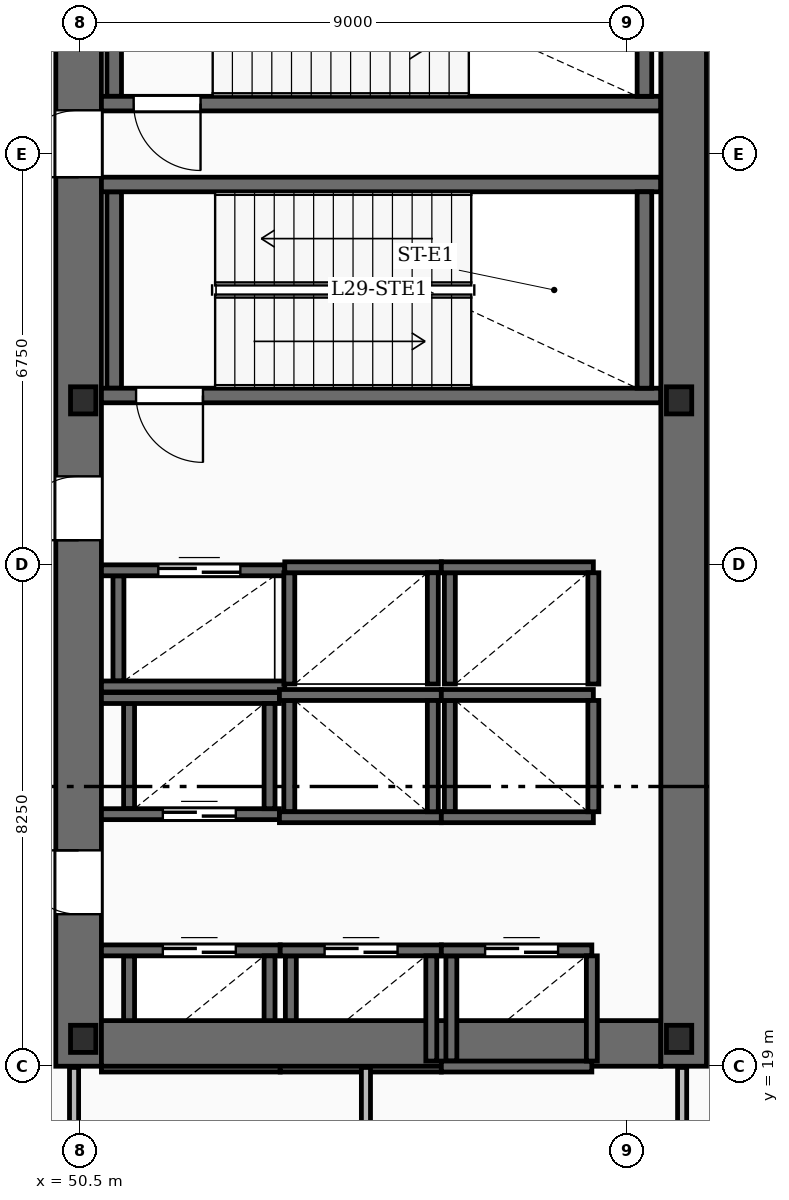
"""IFC4 building model, lengths in metres.
Left out: names, types, materials, properties, quantities, classifications, styles, units other than length and angle.
Written with IfcOpenShell. Run it as: python <this file> out.ifc"""

import sys

from ifc_helpers import new_model, si_unit, direction, frame, frame_2d, origin, origin_2d, place, context, subcontext, project, spatial, rectangle, i_section, extrude, element, fill, save


model = new_model("IFC4")
c1 = context("Model", 3, precision=1e-05, world=origin(), true_north=direction((0.0, 1.0)))
c2 = subcontext(c1, "Body", "Model", "MODEL_VIEW")
j1 = project(units=[si_unit("LENGTHUNIT", "METRE"), si_unit("PLANEANGLEUNIT", "RADIAN")], contexts=[c1])
p1 = place(None, origin())
s1 = spatial("IfcSite", under=j1, at=p1, CompositionType="ELEMENT")
p2 = place(p1, origin())
s2 = spatial("IfcBuilding", under=s1, at=p2, CompositionType="ELEMENT")
p3 = place(p2, frame((0.0, 0.0, 125.95)))
s3 = spatial("IfcBuildingStorey", under=s2, at=p3, CompositionType="ELEMENT", Elevation=125.95)
p4 = place(p3, frame((50.475, 19.0, -0.31), z_axis=(0.0, 0.0, 1.0), x_axis=(0.0, 1.0, 0.0)))
e1 = element("IfcWall", 1, at=p4, inside=s3, PredefinedType="SHEAR", context=c2, shape_type="SweptSolid", body=[
    extrude(rectangle(XDim=20.8, YDim=0.75, at=frame_2d((10.4, 0.0))), origin(), (0.0, 0.0, 1.0), 4.84),
])
p5 = place(p4, frame((2.5, 0.0, 0.31)))
e2 = element("IfcOpeningElement", 2, at=p5, cuts=e1, PredefinedType="OPENING", context=c2, shape_type="SweptSolid", body=[
    extrude(rectangle(XDim=1.05, YDim=2.15, at=frame_2d((0.525, 1.075))), frame((0.0, 0.385, 0.0), z_axis=(0.0, -1.0, 0.0), x_axis=(1.0, 0.0, 0.0)), (0.0, 0.0, 1.0), 0.77),
])
p6 = place(p4, frame((8.65, 0.0, 0.31)))
e3 = element("IfcOpeningElement", 3, at=p6, cuts=e1, PredefinedType="OPENING", context=c2, shape_type="SweptSolid", body=[
    extrude(rectangle(XDim=1.05, YDim=2.15, at=frame_2d((0.525, 1.075))), frame((0.0, 0.385, 0.0), z_axis=(0.0, -1.0, 0.0), x_axis=(1.0, 0.0, 0.0)), (0.0, 0.0, 1.0), 0.77),
])
p7 = place(p4, frame((14.62, 0.0, 0.31)))
e4 = element("IfcOpeningElement", 4, at=p7, cuts=e1, PredefinedType="OPENING", context=c2, shape_type="SweptSolid", body=[
    extrude(rectangle(XDim=1.1, YDim=2.15, at=frame_2d((0.55, 1.075))), frame((0.0, 0.385, 0.0), z_axis=(0.0, -1.0, 0.0), x_axis=(1.0, 0.0, 0.0)), (0.0, 0.0, 1.0), 0.77),
])
p8 = place(p3, frame((60.425, 19.0, -0.31), z_axis=(0.0, 0.0, 1.0), x_axis=(0.0, 1.0, 0.0)))
e5 = element("IfcWall", 5, at=p8, inside=s3, PredefinedType="SHEAR", context=c2, shape_type="SweptSolid", body=[
    extrude(rectangle(XDim=20.8, YDim=0.75, at=frame_2d((10.4, 0.0))), origin(), (0.0, 0.0, 1.0), 4.84),
])
p9 = place(p3, frame((50.85, 19.375, -0.31), z_axis=(0.0, 0.0, 1.0), x_axis=(1.0, 0.0, 0.0)))
e6 = element("IfcWall", 6, at=p9, inside=s3, PredefinedType="SHEAR", context=c2, shape_type="SweptSolid", body=[
    extrude(rectangle(XDim=9.2, YDim=0.75, at=frame_2d((4.6, 0.0))), origin(), (0.0, 0.0, 1.0), 4.84),
])
for number, where, z_axis, x_axis in (
    (7, (50.55, 19.45, -0.31), (0.0, 0.0, 1.0), (1.0, 0.0, 0.0)),
    (8, (60.35, 19.45, -0.31), (0.0, 0.0, 1.0), (1.0, 0.0, 0.0)),
    (9, (50.55, 29.95, -0.31), (0.0, 0.0, 1.0), (1.0, 0.0, 0.0)),
    (10, (60.35, 29.95, -0.31), (0.0, 0.0, 1.0), (1.0, 0.0, 0.0)),
):
    element("IfcColumn", number, at=place(p3, frame(where, z_axis=z_axis, x_axis=x_axis)), inside=s3, PredefinedType="COLUMN", context=c2, shape_type="SweptSolid", body=[
        extrude(i_section(OverallWidth=0.416, OverallDepth=0.446, WebThickness=0.039, FlangeThickness=0.063, FilletRadius=0.02, at=origin_2d()), origin(), (0.0, 0.0, 1.0), 4.84),
    ])
p10 = place(p3, frame((60.05, 30.03, 0.0), z_axis=(0.0, 0.0, 1.0), x_axis=(-1.0, 0.0, 0.0)))
e11 = element("IfcWall", 11, at=p10, inside=s3, PredefinedType="SOLIDWALL", context=c2, shape_type="SweptSolid", body=[
    extrude(rectangle(XDim=9.2, YDim=0.24, at=frame_2d((4.6, 0.0))), origin(), (0.0, 0.0, 1.0), 4.53),
])
p11 = place(p10, frame((7.53, 0.0, 0.0)))
e12 = element("IfcOpeningElement", 12, at=p11, cuts=e11, PredefinedType="OPENING", context=c2, shape_type="SweptSolid", body=[
    extrude(rectangle(XDim=1.1, YDim=2.15, at=frame_2d((0.55, 1.075))), frame((0.0, 0.13, 0.0), z_axis=(0.0, -1.0, 0.0), x_axis=(1.0, 0.0, 0.0)), (0.0, 0.0, 1.0), 0.26),
])
p12 = place(p3, frame((50.85, 33.5, 0.0), z_axis=(0.0, 0.0, 1.0), x_axis=(1.0, 0.0, 0.0)))
e13 = element("IfcWall", 13, at=p12, inside=s3, PredefinedType="SOLIDWALL", context=c2, shape_type="SweptSolid", body=[
    extrude(rectangle(XDim=9.2, YDim=0.24, at=frame_2d((4.6, 0.0))), origin(), (0.0, 0.0, 1.0), 4.53),
])
for number, where, z_axis, x_axis in (
    (14, (51.06, 30.15, 0.0), (0.0, 0.0, 1.0), (0.0, 1.0, 0.0)),
    (15, (59.78, 30.15, 0.0), (0.0, 0.0, 1.0), (0.0, 1.0, 0.0)),
):
    element("IfcWall", number, at=place(p3, frame(where, z_axis=z_axis, x_axis=x_axis)), inside=s3, PredefinedType="SOLIDWALL", context=c2, shape_type="SweptSolid", body=[
        extrude(rectangle(XDim=3.23, YDim=0.24, at=frame_2d((1.615, 0.0))), origin(), (0.0, 0.0, 1.0), 4.53),
    ])
p13 = place(p3, frame((60.05, 34.83, 0.0), z_axis=(0.0, 0.0, 1.0), x_axis=(-1.0, 0.0, 0.0)))
e16 = element("IfcWall", 16, at=p13, inside=s3, PredefinedType="SOLIDWALL", context=c2, shape_type="SweptSolid", body=[
    extrude(rectangle(XDim=9.2, YDim=0.24, at=frame_2d((4.6, 0.0))), origin(), (0.0, 0.0, 1.0), 4.53),
])
p14 = place(p13, frame((7.57, 0.0, 0.0)))
e17 = element("IfcOpeningElement", 17, at=p14, cuts=e16, PredefinedType="OPENING", context=c2, shape_type="SweptSolid", body=[
    extrude(rectangle(XDim=1.1, YDim=2.15, at=frame_2d((0.55, 1.075))), frame((0.0, 0.13, 0.0), z_axis=(0.0, -1.0, 0.0), x_axis=(1.0, 0.0, 0.0)), (0.0, 0.0, 1.0), 0.26),
])
for number, where, z_axis, x_axis in (
    (18, (51.06, 34.95, 0.0), (0.0, 0.0, 1.0), (0.0, 1.0, 0.0)),
    (19, (59.78, 34.95, 0.0), (0.0, 0.0, 1.0), (0.0, 1.0, 0.0)),
):
    element("IfcWall", number, at=place(p3, frame(where, z_axis=z_axis, x_axis=x_axis)), inside=s3, PredefinedType="SOLIDWALL", context=c2, shape_type="SweptSolid", body=[
        extrude(rectangle(XDim=3.15, YDim=0.24, at=frame_2d((1.575, 0.0))), origin(), (0.0, 0.0, 1.0), 4.53),
    ])
p15 = place(p3, frame((50.85, 20.905, 0.0), z_axis=(0.0, 0.0, 1.0), x_axis=(1.0, 0.0, 0.0)))
e20 = element("IfcWall", 20, at=p15, inside=s3, PredefinedType="SOLIDWALL", context=c2, shape_type="SweptSolid", body=[
    extrude(rectangle(XDim=2.94, YDim=0.18, at=frame_2d((1.47, 0.0))), origin(), (0.0, 0.0, 1.0), 4.53),
])
p16 = place(p15, frame((1.01, 0.0, 0.0)))
e21 = element("IfcOpeningElement", 21, at=p16, cuts=e20, PredefinedType="OPENING", context=c2, shape_type="SweptSolid", body=[
    extrude(rectangle(XDim=1.2, YDim=2.2, at=frame_2d((0.6, 1.1))), frame((0.0, 0.1, 0.0), z_axis=(0.0, -1.0, 0.0), x_axis=(1.0, 0.0, 0.0)), (0.0, 0.0, 1.0), 0.2),
])
p17 = place(p3, frame((50.85, 18.995, 0.0), z_axis=(0.0, 0.0, 1.0), x_axis=(1.0, 0.0, 0.0)))
e22 = element("IfcWall", 22, at=p17, inside=s3, PredefinedType="SOLIDWALL", context=c2, shape_type="SweptSolid", body=[
    extrude(rectangle(XDim=2.94, YDim=0.18, at=frame_2d((1.47, 0.0))), origin(), (0.0, 0.0, 1.0), 4.53),
])
for number, where, z_axis, x_axis in (
    (23, (51.305, 19.085, 0.0), (0.0, 0.0, 1.0), (0.0, 1.0, 0.0)),
    (24, (53.615, 19.085, 0.0), (0.0, 0.0, 1.0), (0.0, 1.0, 0.0)),
):
    element("IfcWall", number, at=place(p3, frame(where, z_axis=z_axis, x_axis=x_axis)), inside=s3, PredefinedType="SOLIDWALL", context=c2, shape_type="SweptSolid", body=[
        extrude(rectangle(XDim=1.73, YDim=0.18, at=frame_2d((0.865, 0.0))), origin(), (0.0, 0.0, 1.0), 4.53),
    ])
p18 = place(p3, frame((53.79, 20.905, 0.0), z_axis=(0.0, 0.0, 1.0), x_axis=(1.0, 0.0, 0.0)))
e25 = element("IfcWall", 25, at=p18, inside=s3, PredefinedType="SOLIDWALL", context=c2, shape_type="SweptSolid", body=[
    extrude(rectangle(XDim=2.65, YDim=0.18, at=frame_2d((1.325, 0.0))), origin(), (0.0, 0.0, 1.0), 4.53),
])
p19 = place(p18, frame((0.73, 0.0, 0.0)))
e26 = element("IfcOpeningElement", 26, at=p19, cuts=e25, PredefinedType="OPENING", context=c2, shape_type="SweptSolid", body=[
    extrude(rectangle(XDim=1.2, YDim=2.2, at=frame_2d((0.6, 1.1))), frame((0.0, 0.1, 0.0), z_axis=(0.0, -1.0, 0.0), x_axis=(1.0, 0.0, 0.0)), (0.0, 0.0, 1.0), 0.2),
])
p20 = place(p3, frame((53.79, 18.995, 0.0), z_axis=(0.0, 0.0, 1.0), x_axis=(1.0, 0.0, 0.0)))
e27 = element("IfcWall", 27, at=p20, inside=s3, PredefinedType="SOLIDWALL", context=c2, shape_type="SweptSolid", body=[
    extrude(rectangle(XDim=2.65, YDim=0.18, at=frame_2d((1.325, 0.0))), origin(), (0.0, 0.0, 1.0), 4.53),
])
for number, where, z_axis, x_axis in (
    (28, (53.965, 19.085, 0.0), (0.0, 0.0, 1.0), (0.0, 1.0, 0.0)),
    (29, (56.275, 19.085, 0.0), (0.0, 0.0, 1.0), (0.0, 1.0, 0.0)),
):
    element("IfcWall", number, at=place(p3, frame(where, z_axis=z_axis, x_axis=x_axis)), inside=s3, PredefinedType="SOLIDWALL", context=c2, shape_type="SweptSolid", body=[
        extrude(rectangle(XDim=1.73, YDim=0.18, at=frame_2d((0.865, 0.0))), origin(), (0.0, 0.0, 1.0), 4.53),
    ])
p21 = place(p3, frame((56.44, 20.905, 0.0), z_axis=(0.0, 0.0, 1.0), x_axis=(1.0, 0.0, 0.0)))
e30 = element("IfcWall", 30, at=p21, inside=s3, PredefinedType="SOLIDWALL", context=c2, shape_type="SweptSolid", body=[
    extrude(rectangle(XDim=2.475, YDim=0.18, at=frame_2d((1.238, 0.0))), origin(), (0.0, 0.0, 1.0), 4.53),
])
p22 = place(p21, frame((0.72, 0.0, 0.0)))
e31 = element("IfcOpeningElement", 31, at=p22, cuts=e30, PredefinedType="OPENING", context=c2, shape_type="SweptSolid", body=[
    extrude(rectangle(XDim=1.2, YDim=2.2, at=frame_2d((0.6, 1.1))), frame((0.0, 0.1, 0.0), z_axis=(0.0, -1.0, 0.0), x_axis=(1.0, 0.0, 0.0)), (0.0, 0.0, 1.0), 0.2),
])
p23 = place(p3, frame((56.44, 18.995, 0.0), z_axis=(0.0, 0.0, 1.0), x_axis=(1.0, 0.0, 0.0)))
e32 = element("IfcWall", 32, at=p23, inside=s3, PredefinedType="SOLIDWALL", context=c2, shape_type="SweptSolid", body=[
    extrude(rectangle(XDim=2.475, YDim=0.18, at=frame_2d((1.238, 0.0))), origin(), (0.0, 0.0, 1.0), 4.53),
])
for number, where, z_axis, x_axis in (
    (33, (56.605, 19.085, 0.0), (0.0, 0.0, 1.0), (0.0, 1.0, 0.0)),
    (34, (58.915, 19.085, 0.0), (0.0, 0.0, 1.0), (0.0, 1.0, 0.0)),
):
    element("IfcWall", number, at=place(p3, frame(where, z_axis=z_axis, x_axis=x_axis)), inside=s3, PredefinedType="SOLIDWALL", context=c2, shape_type="SweptSolid", body=[
        extrude(rectangle(XDim=1.73, YDim=0.18, at=frame_2d((0.865, 0.0))), origin(), (0.0, 0.0, 1.0), 4.53),
    ])
p24 = place(p3, frame((50.85, 25.055, 0.0), z_axis=(0.0, 0.0, 1.0), x_axis=(1.0, 0.0, 0.0)))
e35 = element("IfcWall", 35, at=p24, inside=s3, PredefinedType="SOLIDWALL", context=c2, shape_type="SweptSolid", body=[
    extrude(rectangle(XDim=2.927, YDim=0.18, at=frame_2d((1.464, 0.0))), origin(), (0.0, 0.0, 1.0), 4.53),
])
p25 = place(p3, frame((50.85, 23.145, 0.0), z_axis=(0.0, 0.0, 1.0), x_axis=(1.0, 0.0, 0.0)))
e36 = element("IfcWall", 36, at=p25, inside=s3, PredefinedType="SOLIDWALL", context=c2, shape_type="SweptSolid", body=[
    extrude(rectangle(XDim=2.927, YDim=0.18, at=frame_2d((1.464, 0.0))), origin(), (0.0, 0.0, 1.0), 4.53),
])
p26 = place(p25, frame((1.01, 0.0, 0.0)))
e37 = element("IfcOpeningElement", 37, at=p26, cuts=e36, PredefinedType="OPENING", context=c2, shape_type="SweptSolid", body=[
    extrude(rectangle(XDim=1.2, YDim=2.2, at=frame_2d((0.6, 1.1))), frame((0.0, 0.1, 0.0), z_axis=(0.0, -1.0, 0.0), x_axis=(1.0, 0.0, 0.0)), (0.0, 0.0, 1.0), 0.2),
])
for number, where, z_axis, x_axis in (
    (38, (51.305, 23.235, 0.0), (0.0, 0.0, 1.0), (0.0, 1.0, 0.0)),
    (39, (53.615, 23.235, 0.0), (0.0, 0.0, 1.0), (0.0, 1.0, 0.0)),
):
    element("IfcWall", number, at=place(p3, frame(where, z_axis=z_axis, x_axis=x_axis)), inside=s3, PredefinedType="SOLIDWALL", context=c2, shape_type="SweptSolid", body=[
        extrude(rectangle(XDim=1.73, YDim=0.18, at=frame_2d((0.865, 0.0))), origin(), (0.0, 0.0, 1.0), 4.53),
    ])
for number, where, z_axis, x_axis in (
    (40, (53.778, 25.105, 0.0), (0.0, 0.0, 1.0), (1.0, 0.0, 0.0)),
    (41, (53.778, 23.095, 0.0), (0.0, 0.0, 1.0), (1.0, 0.0, 0.0)),
):
    element("IfcWall", number, at=place(p3, frame(where, z_axis=z_axis, x_axis=x_axis)), inside=s3, PredefinedType="SOLIDWALL", context=c2, shape_type="SweptSolid", body=[
        extrude(rectangle(XDim=2.662, YDim=0.18, at=frame_2d((1.331, 0.0))), origin(), (0.0, 0.0, 1.0), 4.53),
    ])
for number, where, z_axis, x_axis in (
    (42, (53.94, 23.185, 0.0), (0.0, 0.0, 1.0), (0.0, 1.0, 0.0)),
    (43, (56.3, 23.185, 0.0), (0.0, 0.0, 1.0), (0.0, 1.0, 0.0)),
):
    element("IfcWall", number, at=place(p3, frame(where, z_axis=z_axis, x_axis=x_axis)), inside=s3, PredefinedType="SOLIDWALL", context=c2, shape_type="SweptSolid", body=[
        extrude(rectangle(XDim=1.83, YDim=0.18, at=frame_2d((0.915, 0.0))), origin(), (0.0, 0.0, 1.0), 4.53),
    ])
for number, where, z_axis, x_axis in (
    (44, (56.44, 25.105, 0.0), (0.0, 0.0, 1.0), (1.0, 0.0, 0.0)),
    (45, (56.44, 23.095, 0.0), (0.0, 0.0, 1.0), (1.0, 0.0, 0.0)),
):
    element("IfcWall", number, at=place(p3, frame(where, z_axis=z_axis, x_axis=x_axis)), inside=s3, PredefinedType="SOLIDWALL", context=c2, shape_type="SweptSolid", body=[
        extrude(rectangle(XDim=2.5, YDim=0.18, at=frame_2d((1.25, 0.0))), origin(), (0.0, 0.0, 1.0), 4.53),
    ])
for number, where, z_axis, x_axis in (
    (46, (56.58, 23.185, 0.0), (0.0, 0.0, 1.0), (0.0, 1.0, 0.0)),
    (47, (58.94, 23.185, 0.0), (0.0, 0.0, 1.0), (0.0, 1.0, 0.0)),
):
    element("IfcWall", number, at=place(p3, frame(where, z_axis=z_axis, x_axis=x_axis)), inside=s3, PredefinedType="SOLIDWALL", context=c2, shape_type="SweptSolid", body=[
        extrude(rectangle(XDim=1.83, YDim=0.18, at=frame_2d((0.915, 0.0))), origin(), (0.0, 0.0, 1.0), 4.53),
    ])
p27 = place(p3, frame((53.865, 27.205, 0.0), z_axis=(0.0, 0.0, 1.0), x_axis=(1.0, 0.0, 0.0)))
e48 = element("IfcWall", 48, at=p27, inside=s3, PredefinedType="SOLIDWALL", context=c2, shape_type="SweptSolid", body=[
    extrude(rectangle(XDim=2.575, YDim=0.18, at=frame_2d((1.288, 0.0))), origin(), (0.0, 0.0, 1.0), 4.53),
])
for number, where, z_axis, x_axis in (
    (49, (53.94, 25.285, 0.0), (0.0, 0.0, 1.0), (0.0, 1.0, 0.0)),
    (50, (56.3, 25.285, 0.0), (0.0, 0.0, 1.0), (0.0, 1.0, 0.0)),
):
    element("IfcWall", number, at=place(p3, frame(where, z_axis=z_axis, x_axis=x_axis)), inside=s3, PredefinedType="SOLIDWALL", context=c2, shape_type="SweptSolid", body=[
        extrude(rectangle(XDim=1.83, YDim=0.18, at=frame_2d((0.915, 0.0))), origin(), (0.0, 0.0, 1.0), 4.53),
    ])
p28 = place(p3, frame((56.44, 27.205, 0.0), z_axis=(0.0, 0.0, 1.0), x_axis=(1.0, 0.0, 0.0)))
e51 = element("IfcWall", 51, at=p28, inside=s3, PredefinedType="SOLIDWALL", context=c2, shape_type="SweptSolid", body=[
    extrude(rectangle(XDim=2.5, YDim=0.18, at=frame_2d((1.25, 0.0))), origin(), (0.0, 0.0, 1.0), 4.53),
])
for number, where, z_axis, x_axis in (
    (52, (56.58, 25.285, 0.0), (0.0, 0.0, 1.0), (0.0, 1.0, 0.0)),
    (53, (58.94, 25.285, 0.0), (0.0, 0.0, 1.0), (0.0, 1.0, 0.0)),
):
    element("IfcWall", number, at=place(p3, frame(where, z_axis=z_axis, x_axis=x_axis)), inside=s3, PredefinedType="SOLIDWALL", context=c2, shape_type="SweptSolid", body=[
        extrude(rectangle(XDim=1.83, YDim=0.18, at=frame_2d((0.915, 0.0))), origin(), (0.0, 0.0, 1.0), 4.53),
    ])
p29 = place(p3, frame((50.85, 27.155, 0.0), z_axis=(0.0, 0.0, 1.0), x_axis=(1.0, 0.0, 0.0)))
e54 = element("IfcWall", 54, at=p29, inside=s3, PredefinedType="SOLIDWALL", context=c2, shape_type="SweptSolid", body=[
    extrude(rectangle(XDim=3.015, YDim=0.18, at=frame_2d((1.507, 0.0))), origin(), (0.0, 0.0, 1.0), 4.53),
])
p30 = place(p29, frame((0.935, 0.0, 0.0)))
e55 = element("IfcOpeningElement", 55, at=p30, cuts=e54, PredefinedType="OPENING", context=c2, shape_type="SweptSolid", body=[
    extrude(rectangle(XDim=1.35, YDim=2.3, at=frame_2d((0.675, 1.15))), frame((0.0, 0.1, 0.0), z_axis=(0.0, -1.0, 0.0), x_axis=(1.0, 0.0, 0.0)), (0.0, 0.0, 1.0), 0.2),
])
p31 = place(p3, frame((50.85, 25.245, 0.0), z_axis=(0.0, 0.0, 1.0), x_axis=(1.0, 0.0, 0.0)))
e56 = element("IfcWall", 56, at=p31, inside=s3, PredefinedType="SOLIDWALL", context=c2, shape_type="SweptSolid", body=[
    extrude(rectangle(XDim=3.015, YDim=0.18, at=frame_2d((1.507, 0.0))), origin(), (0.0, 0.0, 1.0), 4.53),
])
p32 = place(p3, frame((51.13, 25.335, 0.0), z_axis=(0.0, 0.0, 1.0), x_axis=(0.0, 1.0, 0.0)))
e57 = element("IfcWall", 57, at=p32, inside=s3, PredefinedType="SOLIDWALL", context=c2, shape_type="SweptSolid", body=[
    extrude(rectangle(XDim=1.73, YDim=0.18, at=frame_2d((0.865, 0.0))), origin(), (0.0, 0.0, 1.0), 4.53),
])
for number, where, z_axis, x_axis in (
    (58, (55.2, 15.4, 0.0), (0.0, 0.0, 1.0), (0.0, 1.0, 0.0)),
    (59, (50.4, 15.4, 0.0), (0.0, 0.0, 1.0), (0.0, 1.0, 0.0)),
    (60, (60.4, 15.4, 0.0), (0.0, 0.0, 1.0), (0.0, 1.0, 0.0)),
):
    element("IfcWall", number, at=place(p3, frame(where, z_axis=z_axis, x_axis=x_axis)), inside=s3, PredefinedType="PARTITIONING", context=c2, shape_type="SweptSolid", body=[
        extrude(rectangle(XDim=3.58, YDim=0.15, at=frame_2d((1.79, 0.0))), origin(), (0.0, 0.0, 1.0), 3.59),
    ])
p33 = place(p5, origin())
e61 = element("IfcDoor", 61, at=p33, inside=s3, OperationType="SINGLE_SWING_RIGHT", PredefinedType="DOOR", context=c2, shape_type="SweptSolid", body=[
    extrude(rectangle(XDim=1.05, YDim=2.15, at=frame_2d((0.525, 1.075))), frame((0.0, 0.025, 0.0), z_axis=(0.0, -1.0, 0.0), x_axis=(1.0, 0.0, 0.0)), (0.0, 0.0, 1.0), 0.05),
])
fill(e2, e61)
p34 = place(p6, origin())
e62 = element("IfcDoor", 62, at=p34, inside=s3, OperationType="SINGLE_SWING_LEFT", PredefinedType="DOOR", context=c2, shape_type="SweptSolid", body=[
    extrude(rectangle(XDim=1.05, YDim=2.15, at=frame_2d((0.525, 1.075))), frame((0.0, 0.025, 0.0), z_axis=(0.0, -1.0, 0.0), x_axis=(1.0, 0.0, 0.0)), (0.0, 0.0, 1.0), 0.05),
])
fill(e3, e62)
p35 = place(p7, origin())
e63 = element("IfcDoor", 63, at=p35, inside=s3, OperationType="SINGLE_SWING_LEFT", PredefinedType="DOOR", context=c2, shape_type="SweptSolid", body=[
    extrude(rectangle(XDim=1.1, YDim=2.15, at=frame_2d((0.55, 1.075))), frame((0.0, 0.025, 0.0), z_axis=(0.0, -1.0, 0.0), x_axis=(1.0, 0.0, 0.0)), (0.0, 0.0, 1.0), 0.05),
])
fill(e4, e63)
p36 = place(p11, origin())
e64 = element("IfcDoor", 64, at=p36, inside=s3, OperationType="SINGLE_SWING_LEFT", PredefinedType="DOOR", context=c2, shape_type="SweptSolid", body=[
    extrude(rectangle(XDim=1.1, YDim=2.15, at=frame_2d((0.55, 1.075))), frame((0.0, 0.025, 0.0), z_axis=(0.0, -1.0, 0.0), x_axis=(1.0, 0.0, 0.0)), (0.0, 0.0, 1.0), 0.05),
])
fill(e12, e64)
p37 = place(p14, origin())
e65 = element("IfcDoor", 65, at=p37, inside=s3, OperationType="SINGLE_SWING_LEFT", PredefinedType="DOOR", context=c2, shape_type="SweptSolid", body=[
    extrude(rectangle(XDim=1.1, YDim=2.15, at=frame_2d((0.55, 1.075))), frame((0.0, 0.025, 0.0), z_axis=(0.0, -1.0, 0.0), x_axis=(1.0, 0.0, 0.0)), (0.0, 0.0, 1.0), 0.05),
])
fill(e17, e65)
p38 = place(p16, origin())
e66 = element("IfcDoor", 66, at=p38, inside=s3, OperationType="DOUBLE_DOOR_SLIDING", PredefinedType="DOOR", context=c2, shape_type="SweptSolid", body=[
    extrude(rectangle(XDim=1.2, YDim=2.2, at=frame_2d((0.6, 1.1))), frame((0.0, 0.025, 0.0), z_axis=(0.0, -1.0, 0.0), x_axis=(1.0, 0.0, 0.0)), (0.0, 0.0, 1.0), 0.05),
])
fill(e21, e66)
p39 = place(p19, origin())
e67 = element("IfcDoor", 67, at=p39, inside=s3, OperationType="DOUBLE_DOOR_SLIDING", PredefinedType="DOOR", context=c2, shape_type="SweptSolid", body=[
    extrude(rectangle(XDim=1.2, YDim=2.2, at=frame_2d((0.6, 1.1))), frame((0.0, 0.025, 0.0), z_axis=(0.0, -1.0, 0.0), x_axis=(1.0, 0.0, 0.0)), (0.0, 0.0, 1.0), 0.05),
])
fill(e26, e67)
p40 = place(p22, origin())
e68 = element("IfcDoor", 68, at=p40, inside=s3, OperationType="DOUBLE_DOOR_SLIDING", PredefinedType="DOOR", context=c2, shape_type="SweptSolid", body=[
    extrude(rectangle(XDim=1.2, YDim=2.2, at=frame_2d((0.6, 1.1))), frame((0.0, 0.025, 0.0), z_axis=(0.0, -1.0, 0.0), x_axis=(1.0, 0.0, 0.0)), (0.0, 0.0, 1.0), 0.05),
])
fill(e31, e68)
p41 = place(p26, origin())
e69 = element("IfcDoor", 69, at=p41, inside=s3, OperationType="DOUBLE_DOOR_SLIDING", PredefinedType="DOOR", context=c2, shape_type="SweptSolid", body=[
    extrude(rectangle(XDim=1.2, YDim=2.2, at=frame_2d((0.6, 1.1))), frame((0.0, 0.025, 0.0), z_axis=(0.0, -1.0, 0.0), x_axis=(1.0, 0.0, 0.0)), (0.0, 0.0, 1.0), 0.05),
])
fill(e37, e69)
p42 = place(p30, origin())
e70 = element("IfcDoor", 70, at=p42, inside=s3, OperationType="DOUBLE_DOOR_SLIDING", PredefinedType="DOOR", context=c2, shape_type="SweptSolid", body=[
    extrude(rectangle(XDim=1.35, YDim=2.3, at=frame_2d((0.675, 1.15))), frame((0.0, 0.025, 0.0), z_axis=(0.0, -1.0, 0.0), x_axis=(1.0, 0.0, 0.0)), (0.0, 0.0, 1.0), 0.05),
])
fill(e55, e70)
save(model, sys.argv[1])
